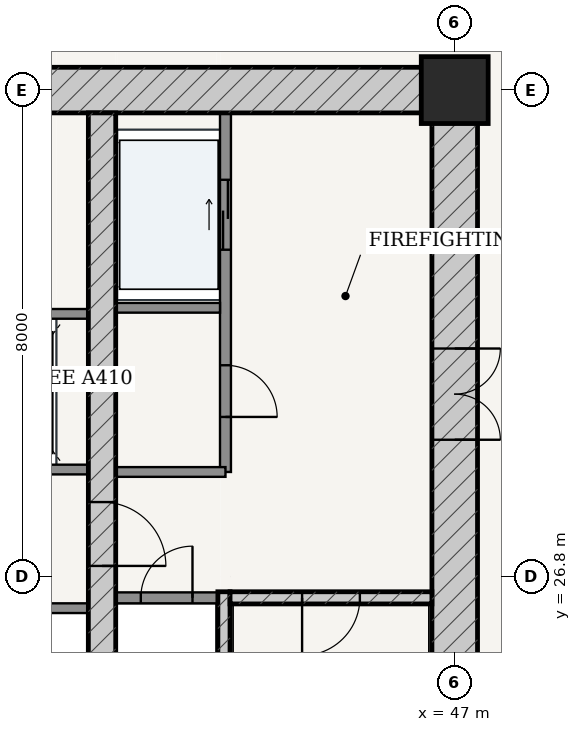
"""IFC4 building model, lengths in metres.
Left out: names, types, materials, properties, quantities, classifications, styles, units other than length and angle.
Written with IfcOpenShell. Run it as: python <this file> out.ifc"""

import sys

from ifc_helpers import new_model, si_unit, direction, frame, frame_2d, origin, origin_2d, place, context, subcontext, project, spatial, rectangle, extrude, source, transform, mapped, element, fill, save


model = new_model("IFC4")
c1 = context("Model", 3, precision=1e-05, world=origin(), true_north=direction((-0.2419218956, 0.970295726276)))
c2 = subcontext(c1, "Body", "Model", "MODEL_VIEW")
j1 = project(units=[si_unit("LENGTHUNIT", "METRE"), si_unit("PLANEANGLEUNIT", "RADIAN")], contexts=[c1])
p1 = place(None, origin())
s1 = spatial("IfcSite", under=j1, at=p1, CompositionType="ELEMENT")
p2 = place(p1, origin())
s2 = spatial("IfcBuilding", under=s1, at=p2, CompositionType="ELEMENT")
p3 = place(p2, frame((0.0, 0.0, 42.0)))
s3 = spatial("IfcBuildingStorey", under=s2, at=p3, CompositionType="ELEMENT", Elevation=42.0)
p4 = place(p3, frame((47.0, 34.8, 0.0), z_axis=(0.0, 0.0, 1.0), x_axis=(1.0, 0.0, 0.0)))
e1 = element("IfcColumn", 1, at=p4, inside=s3, PredefinedType="COLUMN", context=c2, shape_type="SweptSolid", body=[
    extrude(rectangle(XDim=1.1, YDim=1.1, at=origin_2d()), origin(), (0.0, 0.0, 1.0), 3.6),
])
p5 = place(p3, frame((28.625, 34.8, 0.0), z_axis=(0.0, 0.0, 1.0), x_axis=(1.0, 0.0, 0.0)))
e2 = element("IfcWall", 2, at=p5, inside=s3, PredefinedType="SHEAR", context=c2, shape_type="SweptSolid", body=[
    extrude(rectangle(XDim=18.75, YDim=0.75, at=frame_2d((9.375, 0.0))), origin(), (0.0, 0.0, 1.0), 3.32),
])
p6 = place(p5, frame((7.407, 0.0, 0.0)))
e3 = element("IfcOpeningElement", 3, at=p6, cuts=e2, PredefinedType="OPENING", context=c2, shape_type="SweptSolid", body=[
    extrude(rectangle(XDim=0.86, YDim=2.1, at=frame_2d((0.43, 1.05))), frame((0.0, 0.385, 0.0), z_axis=(0.0, -1.0, 0.0), x_axis=(1.0, 0.0, 0.0)), (0.0, 0.0, 1.0), 0.77),
])
p7 = place(p5, frame((10.488, 0.0, 0.0)))
e4 = element("IfcOpeningElement", 4, at=p7, cuts=e2, PredefinedType="OPENING", context=c2, shape_type="SweptSolid", body=[
    extrude(rectangle(XDim=0.85, YDim=2.1, at=frame_2d((0.425, 1.05))), frame((0.0, 0.385, 0.0), z_axis=(0.0, -1.0, 0.0), x_axis=(1.0, 0.0, 0.0)), (0.0, 0.0, 1.0), 0.77),
])
p8 = place(p3, frame((47.0, 19.175, 0.0), z_axis=(0.0, 0.0, 1.0), x_axis=(0.0, 1.0, 0.0)))
e5 = element("IfcWall", 5, at=p8, inside=s3, PredefinedType="SHEAR", context=c2, shape_type="SweptSolid", body=[
    extrude(rectangle(XDim=15.25, YDim=0.75, at=frame_2d((7.625, 0.0))), origin(), (0.0, 0.0, 1.0), 3.32),
])
p9 = place(p8, frame((9.875, 0.0, 0.0)))
e6 = element("IfcOpeningElement", 6, at=p9, cuts=e5, PredefinedType="OPENING", context=c2, shape_type="SweptSolid", body=[
    extrude(rectangle(XDim=1.5, YDim=2.2, at=frame_2d((0.75, 1.1))), frame((0.0, 0.385, 0.0), z_axis=(0.0, -1.0, 0.0), x_axis=(1.0, 0.0, 0.0)), (0.0, 0.0, 1.0), 0.77),
])
p10 = place(p3, frame((43.205, 19.175, 0.0), z_axis=(0.0, 0.0, 1.0), x_axis=(0.0, 1.0, 0.0)))
e7 = element("IfcWall", 7, at=p10, inside=s3, PredefinedType="SOLIDWALL", context=c2, shape_type="SweptSolid", body=[
    extrude(rectangle(XDim=7.375, YDim=0.2, at=frame_2d((3.688, 0.0))), origin(), (0.0, 0.0, 1.0), 3.32),
])
p11 = place(p3, frame((43.305, 26.45, 0.0), z_axis=(0.0, 0.0, 1.0), x_axis=(1.0, 0.0, 0.0)))
e8 = element("IfcWall", 8, at=p11, inside=s3, PredefinedType="SOLIDWALL", context=c2, shape_type="SweptSolid", body=[
    extrude(rectangle(XDim=3.32, YDim=0.2, at=frame_2d((1.66, 0.0))), origin(), (0.0, 0.0, 1.0), 3.32),
])
p12 = place(p11, frame((1.185, 0.0, 0.0)))
e9 = element("IfcOpeningElement", 9, at=p12, cuts=e8, PredefinedType="OPENING", context=c2, shape_type="SweptSolid", body=[
    extrude(rectangle(XDim=0.95, YDim=2.15, at=frame_2d((0.475, 1.075))), frame((0.0, 0.11, 0.0), z_axis=(0.0, -1.0, 0.0), x_axis=(1.0, 0.0, 0.0)), (0.0, 0.0, 1.0), 0.22),
])
p13 = place(p3, frame((41.2, 19.175, 0.0), z_axis=(0.0, 0.0, 1.0), x_axis=(0.0, 1.0, 0.0)))
e10 = element("IfcWall", 10, at=p13, inside=s3, PredefinedType="SHEAR", context=c2, shape_type="SweptSolid", body=[
    extrude(rectangle(XDim=15.25, YDim=0.45, at=frame_2d((7.625, 0.0))), origin(), (0.0, 0.0, 1.0), 3.32),
])
p14 = place(p13, frame((7.8, 0.0, 0.0)))
e11 = element("IfcOpeningElement", 11, at=p14, cuts=e10, PredefinedType="OPENING", context=c2, shape_type="SweptSolid", body=[
    extrude(rectangle(XDim=1.05, YDim=2.15, at=frame_2d((0.525, 1.075))), frame((0.0, 0.235, 0.0), z_axis=(0.0, -1.0, 0.0), x_axis=(1.0, 0.0, 0.0)), (0.0, 0.0, 1.0), 0.47),
])
p15 = place(p3, frame((41.425, 26.45, 0.0), z_axis=(0.0, 0.0, 1.0), x_axis=(1.0, 0.0, 0.0)))
e12 = element("IfcWall", 12, at=p15, inside=s3, PredefinedType="PARTITIONING", context=c2, shape_type="SweptSolid", body=[
    extrude(rectangle(XDim=1.675, YDim=0.18, at=frame_2d((0.837, 0.0))), origin(), (0.0, 0.0, 1.0), 3.32),
])
p16 = place(p15, frame((0.413, 0.0, 0.0)))
e13 = element("IfcOpeningElement", 13, at=p16, cuts=e12, PredefinedType="OPENING", context=c2, shape_type="SweptSolid", body=[
    extrude(rectangle(XDim=0.85, YDim=2.1, at=frame_2d((0.425, 1.05))), frame((0.0, 0.1, 0.0), z_axis=(0.0, -1.0, 0.0), x_axis=(1.0, 0.0, 0.0)), (0.0, 0.0, 1.0), 0.2),
])
p17 = place(p3, frame((43.23, 28.52, 0.0), z_axis=(0.0, 0.0, 1.0), x_axis=(0.0, 1.0, 0.0)))
e14 = element("IfcWall", 14, at=p17, inside=s3, PredefinedType="PARTITIONING", context=c2, shape_type="SweptSolid", body=[
    extrude(rectangle(XDim=5.905, YDim=0.18, at=frame_2d((2.953, 0.0))), origin(), (0.0, 0.0, 1.0), 3.32),
])
p18 = place(p17, frame((0.905, 0.0, 0.0)))
e15 = element("IfcOpeningElement", 15, at=p18, cuts=e14, PredefinedType="OPENING", context=c2, shape_type="SweptSolid", body=[
    extrude(rectangle(XDim=0.85, YDim=2.1, at=frame_2d((0.425, 1.05))), frame((0.0, 0.1, 0.0), z_axis=(0.0, -1.0, 0.0), x_axis=(1.0, 0.0, 0.0)), (0.0, 0.0, 1.0), 0.2),
])
p19 = place(p17, frame((3.655, 0.0, 0.0)))
e16 = element("IfcOpeningElement", 16, at=p19, cuts=e14, PredefinedType="OPENING", context=c2, shape_type="SweptSolid", body=[
    extrude(rectangle(XDim=1.15, YDim=2.2, at=frame_2d((0.575, 1.1))), frame((0.0, 0.1, 0.0), z_axis=(0.0, -1.0, 0.0), x_axis=(1.0, 0.0, 0.0)), (0.0, 0.0, 1.0), 0.2),
])
p20 = place(p3, frame((41.425, 31.22, 0.0), z_axis=(0.0, 0.0, 1.0), x_axis=(1.0, 0.0, 0.0)))
e17 = element("IfcWall", 17, at=p20, inside=s3, PredefinedType="PARTITIONING", context=c2, shape_type="SweptSolid", body=[
    extrude(rectangle(XDim=1.715, YDim=0.16, at=frame_2d((0.857, 0.0))), origin(), (0.0, 0.0, 1.0), 3.32),
])
p21 = place(p3, frame((41.425, 28.52, 0.0), z_axis=(0.0, 0.0, 1.0), x_axis=(1.0, 0.0, 0.0)))
e18 = element("IfcWall", 18, at=p21, inside=s3, PredefinedType="PARTITIONING", context=c2, shape_type="SweptSolid", body=[
    extrude(rectangle(XDim=1.805, YDim=0.16, at=frame_2d((0.902, 0.0))), origin(), (0.0, 0.0, 1.0), 3.32),
])
p22 = place(p3, frame((35.025, 28.56, 0.0), z_axis=(0.0, 0.0, 1.0), x_axis=(1.0, 0.0, 0.0)))
e19 = element("IfcWall", 19, at=p22, inside=s3, PredefinedType="PARTITIONING", context=c2, shape_type="SweptSolid", body=[
    extrude(rectangle(XDim=5.95, YDim=0.16, at=frame_2d((2.975, 0.0))), origin(), (0.0, 0.0, 1.0), 3.32),
])
p23 = place(p22, frame((0.76, 0.0, 0.0)))
e20 = element("IfcOpeningElement", 20, at=p23, cuts=e19, PredefinedType="OPENING", context=c2, shape_type="SweptSolid", body=[
    extrude(rectangle(XDim=1.1, YDim=2.2, at=frame_2d((0.55, 1.1))), frame((0.0, 0.09, 0.0), z_axis=(0.0, -1.0, 0.0), x_axis=(1.0, 0.0, 0.0)), (0.0, 0.0, 1.0), 0.18),
])
p24 = place(p22, frame((2.425, 0.0, 0.0)))
e21 = element("IfcOpeningElement", 21, at=p24, cuts=e19, PredefinedType="OPENING", context=c2, shape_type="SweptSolid", body=[
    extrude(rectangle(XDim=1.1, YDim=2.2, at=frame_2d((0.55, 1.1))), frame((0.0, 0.09, 0.0), z_axis=(0.0, -1.0, 0.0), x_axis=(1.0, 0.0, 0.0)), (0.0, 0.0, 1.0), 0.18),
])
p25 = place(p22, frame((4.09, 0.0, 0.0)))
e22 = element("IfcOpeningElement", 22, at=p25, cuts=e19, PredefinedType="OPENING", context=c2, shape_type="SweptSolid", body=[
    extrude(rectangle(XDim=1.1, YDim=2.2, at=frame_2d((0.55, 1.1))), frame((0.0, 0.09, 0.0), z_axis=(0.0, -1.0, 0.0), x_axis=(1.0, 0.0, 0.0)), (0.0, 0.0, 1.0), 0.18),
])
for number, where, z_axis, x_axis in (
    (23, (35.025, 31.12, 0.0), (0.0, 0.0, 1.0), (1.0, 0.0, 0.0)),
    (24, (35.025, 26.28, 0.0), (0.0, 0.0, 1.0), (1.0, 0.0, 0.0)),
):
    element("IfcWall", number, at=place(p3, frame(where, z_axis=z_axis, x_axis=x_axis)), inside=s3, PredefinedType="PARTITIONING", context=c2, shape_type="SweptSolid", body=[
        extrude(rectangle(XDim=5.95, YDim=0.16, at=frame_2d((2.975, 0.0))), origin(), (0.0, 0.0, 1.0), 3.32),
    ])
m1 = source(origin(), c2, "Body", "SweptSolid", [
    extrude(rectangle(XDim=1.5, YDim=2.2, at=frame_2d((0.75, 1.1))), frame((0.0, 0.025, 0.0), z_axis=(0.0, -1.0, 0.0), x_axis=(1.0, 0.0, 0.0)), (0.0, 0.0, 1.0), 0.05),
])
p26 = place(p9, frame((1.5, 0.0, 0.0), z_axis=(0.0, 0.0, 1.0), x_axis=(-1.0, 0.0, 0.0)))
e25 = element("IfcDoor", 25, at=p26, inside=s3, OperationType="DOUBLE_DOOR_SINGLE_SWING", PredefinedType="DOOR", context=c2, shape_type="MappedRepresentation", body=[
    mapped(m1, transform((0.0, 0.0, 0.0), scale=1.0)),
])
fill(e6, e25)
m2 = source(origin(), c2, "Body", "SweptSolid", [
    extrude(rectangle(XDim=1.05, YDim=2.15, at=frame_2d((0.525, 1.075))), frame((0.0, 0.025, 0.0), z_axis=(0.0, -1.0, 0.0), x_axis=(1.0, 0.0, 0.0)), (0.0, 0.0, 1.0), 0.05),
])
p27 = place(p14, frame((1.05, 0.0, 0.0), z_axis=(0.0, 0.0, 1.0), x_axis=(-1.0, 0.0, 0.0)))
e26 = element("IfcDoor", 26, at=p27, inside=s3, OperationType="SINGLE_SWING_RIGHT", PredefinedType="DOOR", context=c2, shape_type="MappedRepresentation", body=[
    mapped(m2, transform((0.0, 0.0, 0.0), scale=1.0)),
])
fill(e11, e26)
m3 = source(origin(), c2, "Body", "SweptSolid", [
    extrude(rectangle(XDim=0.95, YDim=2.15, at=frame_2d((0.475, 1.075))), frame((0.0, 0.025, 0.0), z_axis=(0.0, -1.0, 0.0), x_axis=(1.0, 0.0, 0.0)), (0.0, 0.0, 1.0), 0.05),
])
p28 = place(p12, frame((0.95, 0.0, 0.0), z_axis=(0.0, 0.0, 1.0), x_axis=(-1.0, 0.0, 0.0)))
e27 = element("IfcDoor", 27, at=p28, inside=s3, OperationType="SINGLE_SWING_RIGHT", PredefinedType="DOOR", context=c2, shape_type="MappedRepresentation", body=[
    mapped(m3, transform((0.0, 0.0, 0.0), scale=1.0)),
])
fill(e9, e27)
m4 = source(origin(), c2, "Body", "SweptSolid", [
    extrude(rectangle(XDim=0.85, YDim=2.1, at=frame_2d((0.425, 1.05))), frame((0.0, 0.025, 0.0), z_axis=(0.0, -1.0, 0.0), x_axis=(1.0, 0.0, 0.0)), (0.0, 0.0, 1.0), 0.05),
])
p29 = place(p16, origin())
e28 = element("IfcDoor", 28, at=p29, inside=s3, OperationType="SINGLE_SWING_RIGHT", PredefinedType="DOOR", context=c2, shape_type="MappedRepresentation", body=[
    mapped(m4, transform((0.0, 0.0, 0.0), scale=1.0)),
])
fill(e13, e28)
p30 = place(p18, frame((0.85, 0.0, 0.0), z_axis=(0.0, 0.0, 1.0), x_axis=(-1.0, 0.0, 0.0)))
e29 = element("IfcDoor", 29, at=p30, inside=s3, OperationType="SINGLE_SWING_RIGHT", PredefinedType="DOOR", context=c2, shape_type="MappedRepresentation", body=[
    mapped(m4, transform((0.0, 0.0, 0.0), scale=1.0)),
])
fill(e15, e29)
m5 = source(origin(), c2, "Body", "SweptSolid", [
    extrude(rectangle(XDim=1.15, YDim=2.2, at=frame_2d((0.575, 1.1))), frame((0.0, 0.025, 0.0), z_axis=(0.0, -1.0, 0.0), x_axis=(1.0, 0.0, 0.0)), (0.0, 0.0, 1.0), 0.05),
])
p31 = place(p19, origin())
e30 = element("IfcDoor", 30, at=p31, inside=s3, OperationType="DOUBLE_DOOR_SLIDING", PredefinedType="DOOR", context=c2, shape_type="MappedRepresentation", body=[
    mapped(m5, transform((0.0, 0.0, 0.0), scale=1.0)),
])
fill(e16, e30)
save(model, sys.argv[1])
